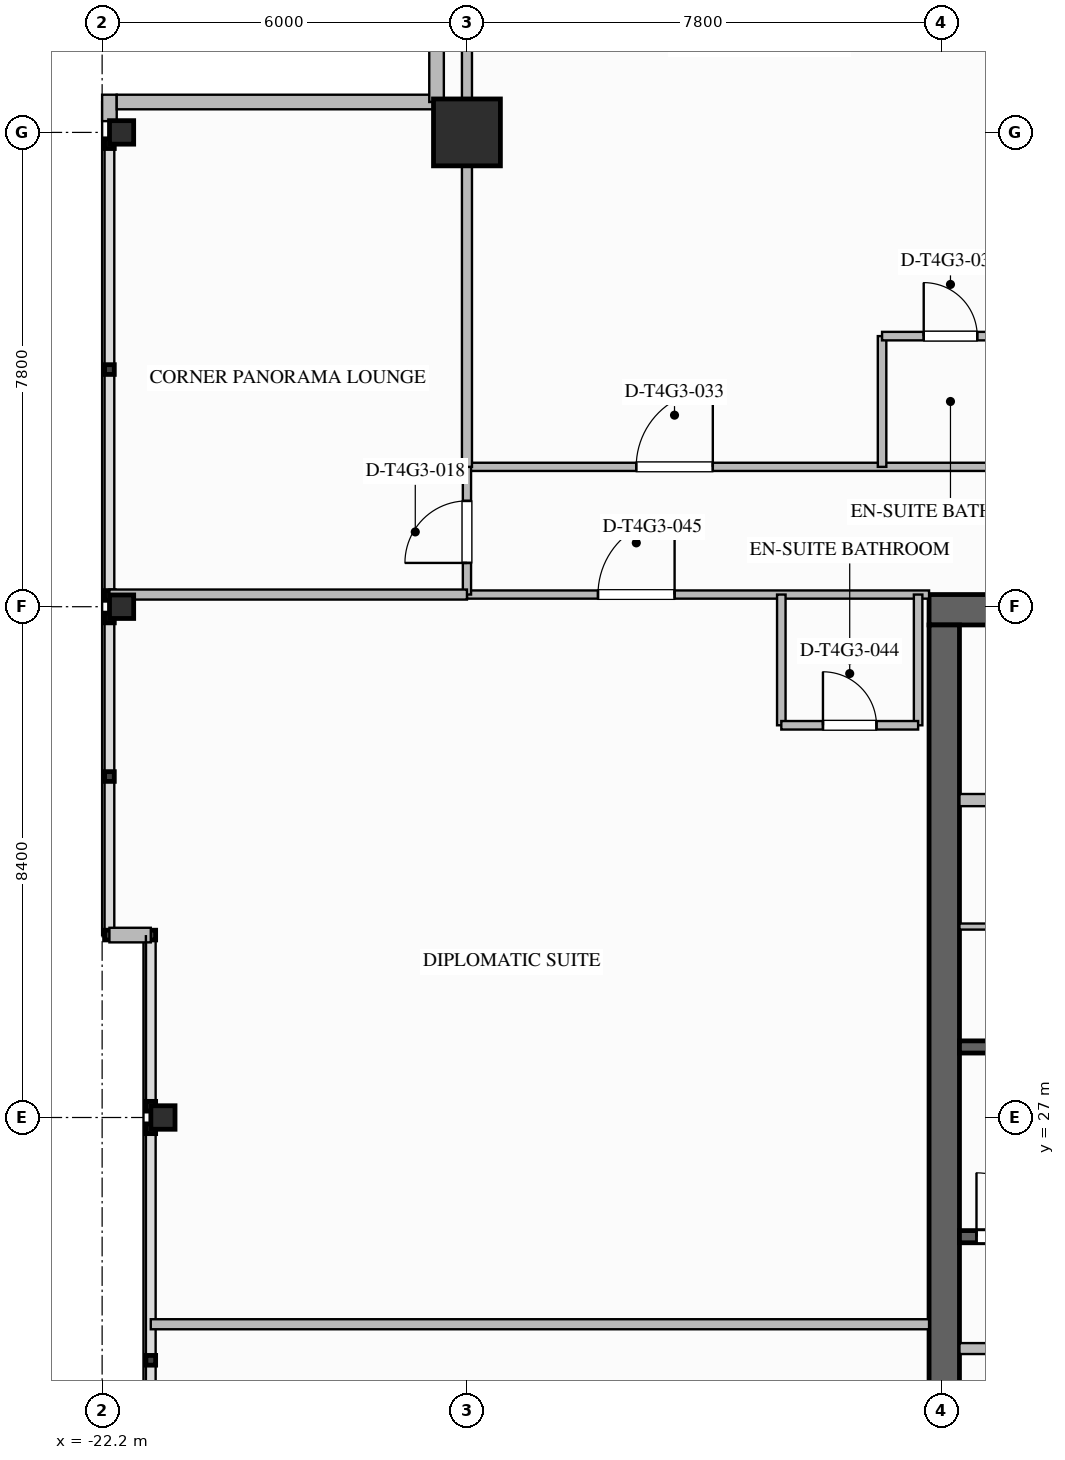
"""IFC4 building model, lengths in metres.
Left out: names, types, materials, properties, quantities, classifications, styles, units other than length and angle.
Written with IfcOpenShell. Run it as: python <this file> out.ifc"""

import sys

from ifc_helpers import new_model, si_unit, direction, frame, frame_2d, origin, origin_2d, place, context, subcontext, project, spatial, rectangle, i_section, extrude, element, fill, save


model = new_model("IFC4")
c1 = context("Model", 3, precision=1e-05, world=origin(), true_north=direction((0.0, 1.0)))
c2 = subcontext(c1, "Body", "Model", "MODEL_VIEW")
j1 = project(units=[si_unit("LENGTHUNIT", "METRE"), si_unit("PLANEANGLEUNIT", "RADIAN")], contexts=[c1])
p1 = place(None, origin())
s1 = spatial("IfcSite", under=j1, at=p1, CompositionType="ELEMENT")
p2 = place(p1, origin())
s2 = spatial("IfcBuilding", under=s1, at=p2, CompositionType="ELEMENT")
p3 = place(p2, frame((0.0, 0.0, 226.7)))
s3 = spatial("IfcBuildingStorey", under=s2, at=p3, CompositionType="ELEMENT", Elevation=226.7)
p4 = place(p3, frame((-8.6, 35.35, 0.0), z_axis=(0.0, 0.0, 1.0), x_axis=(1.0, 0.0, 0.0)))
e1 = element("IfcWall", 1, at=p4, inside=s3, PredefinedType="SHEAR", context=c2, shape_type="SweptSolid", body=[
    extrude(rectangle(XDim=17.2, YDim=0.5, at=frame_2d((8.6, 0.0))), origin(), (0.0, 0.0, 1.0), 3.6),
])
p5 = place(p3, frame((-8.35, 18.9, 0.0), z_axis=(0.0, 0.0, 1.0), x_axis=(0.0, 1.0, 0.0)))
e2 = element("IfcWall", 2, at=p5, inside=s3, PredefinedType="SHEAR", context=c2, shape_type="SweptSolid", body=[
    extrude(rectangle(XDim=16.2, YDim=0.5, at=frame_2d((8.1, 0.0))), origin(), (0.0, 0.0, 1.0), 3.6),
])
p6 = place(p3, frame((-16.2, 43.2, 0.0), z_axis=(0.0, 0.0, 1.0), x_axis=(1.0, 0.0, 0.0)))
e3 = element("IfcColumn", 3, at=p6, inside=s3, PredefinedType="COLUMN", context=c2, shape_type="SweptSolid", body=[
    extrude(rectangle(XDim=1.1, YDim=1.1, at=origin_2d()), origin(), (0.0, 0.0, 1.0), 3.6),
])
for number, where, z_axis, x_axis in (
    (4, (-21.2, 27.0, 0.0), (0.0, 0.0, 1.0), (1.0, 0.0, 0.0)),
    (5, (-21.88, 35.4, 0.0), (0.0, 0.0, 1.0), (1.0, 0.0, 0.0)),
    (6, (-21.88, 43.2, 0.0), (0.0, 0.0, 1.0), (1.0, 0.0, 0.0)),
):
    element("IfcColumn", number, at=place(p3, frame(where, z_axis=z_axis, x_axis=x_axis)), inside=s3, PredefinedType="COLUMN", context=c2, shape_type="SweptSolid", body=[
        extrude(i_section(OverallWidth=0.397, OverallDepth=0.387, WebThickness=0.021, FlangeThickness=0.033, FilletRadius=0.025, at=origin_2d()), origin(), (0.0, 0.0, 1.0), 3.597),
    ])
p7 = place(p3, frame((-22.08, 43.385, 0.0), z_axis=(0.0, 0.0, 1.0), x_axis=(0.0, 1.0, 0.0)))
e7 = element("IfcWall", 7, at=p7, inside=s3, PredefinedType="STANDARD", context=c2, shape_type="SweptSolid", body=[
    extrude(rectangle(XDim=0.435, YDim=0.24, at=frame_2d((0.217, 0.0))), origin(), (0.0, 0.0, 1.0), 3.34),
])
for number, where, z_axis, x_axis in (
    (8, (-21.96, 43.7, 0.0), (0.0, 0.0, 1.0), (1.0, 0.0, 0.0)),
    (9, (-16.7, 43.7, 0.0), (0.0, 0.0, 1.0), (0.0, 1.0, 0.0)),
):
    element("IfcWall", number, at=place(p3, frame(where, z_axis=z_axis, x_axis=x_axis)), inside=s3, PredefinedType="STANDARD", context=c2, shape_type="SweptSolid", body=[
        extrude(rectangle(XDim=5.26, YDim=0.24, at=frame_2d((2.63, 0.0))), origin(), (0.0, 0.0, 1.0), 3.34),
    ])
p8 = place(p3, frame((-21.4, 30.0, 0.0), z_axis=(0.0, 0.0, 1.0), x_axis=(-1.0, 0.0, 0.0)))
e10 = element("IfcWall", 10, at=p8, inside=s3, PredefinedType="STANDARD", context=c2, shape_type="SweptSolid", body=[
    extrude(rectangle(XDim=0.68, YDim=0.24, at=frame_2d((0.34, 0.0))), origin(), (0.0, 0.0, 1.0), 3.34),
])
p9 = place(p3, frame((-8.1, 25.04, 0.0), z_axis=(0.0, 0.0, 1.0), x_axis=(1.0, 0.0, 0.0)))
e11 = element("IfcWall", 11, at=p9, inside=s3, PredefinedType="SOLIDWALL", context=c2, shape_type="SweptSolid", body=[
    extrude(rectangle(XDim=8.1, YDim=0.2, at=frame_2d((4.05, 0.0))), origin(), (0.0, 0.0, 1.0), 3.34),
])
p10 = place(p9, frame((0.28, 0.0, 0.0)))
e12 = element("IfcOpeningElement", 12, at=p10, cuts=e11, PredefinedType="OPENING", context=c2, shape_type="SweptSolid", body=[
    extrude(rectangle(XDim=1.05, YDim=2.1, at=frame_2d((0.525, 1.05))), frame((0.0, 0.11, 0.0), z_axis=(0.0, -1.0, 0.0), x_axis=(1.0, 0.0, 0.0)), (0.0, 0.0, 1.0), 0.22),
])
p11 = place(p3, frame((-8.1, 28.16, 0.0), z_axis=(0.0, 0.0, 1.0), x_axis=(1.0, 0.0, 0.0)))
e13 = element("IfcWall", 13, at=p11, inside=s3, PredefinedType="SOLIDWALL", context=c2, shape_type="SweptSolid", body=[
    extrude(rectangle(XDim=8.1, YDim=0.2, at=frame_2d((4.05, 0.0))), origin(), (0.0, 0.0, 1.0), 3.34),
])
p12 = place(p3, frame((-8.1, 32.22, 0.0), z_axis=(0.0, 0.0, 1.0), x_axis=(1.0, 0.0, 0.0)))
e14 = element("IfcWall", 14, at=p12, inside=s3, PredefinedType="SOLIDWALL", context=c2, shape_type="SweptSolid", body=[
    extrude(rectangle(XDim=7.1, YDim=0.2, at=frame_2d((3.55, 0.0))), origin(), (0.0, 0.0, 1.0), 3.34),
])
p13 = place(p12, frame((0.95, 0.0, 0.0)))
e15 = element("IfcOpeningElement", 15, at=p13, cuts=e14, PredefinedType="OPENING", context=c2, shape_type="SweptSolid", body=[
    extrude(rectangle(XDim=1.1, YDim=2.2, at=frame_2d((0.55, 1.1))), frame((0.0, 0.11, 0.0), z_axis=(0.0, -1.0, 0.0), x_axis=(1.0, 0.0, 0.0)), (0.0, 0.0, 1.0), 0.22),
])
p14 = place(p12, frame((3.27, 0.0, 0.0)))
e16 = element("IfcOpeningElement", 16, at=p14, cuts=e14, PredefinedType="OPENING", context=c2, shape_type="SweptSolid", body=[
    extrude(rectangle(XDim=1.1, YDim=2.2, at=frame_2d((0.55, 1.1))), frame((0.0, 0.11, 0.0), z_axis=(0.0, -1.0, 0.0), x_axis=(1.0, 0.0, 0.0)), (0.0, 0.0, 1.0), 0.22),
])
p15 = place(p12, frame((5.59, 0.0, 0.0)))
e17 = element("IfcOpeningElement", 17, at=p15, cuts=e14, PredefinedType="OPENING", context=c2, shape_type="SweptSolid", body=[
    extrude(rectangle(XDim=1.1, YDim=2.2, at=frame_2d((0.55, 1.1))), frame((0.0, 0.11, 0.0), z_axis=(0.0, -1.0, 0.0), x_axis=(1.0, 0.0, 0.0)), (0.0, 0.0, 1.0), 0.22),
])
p16 = place(p3, frame((-8.1, 30.14, 0.0), z_axis=(0.0, 0.0, 1.0), x_axis=(1.0, 0.0, 0.0)))
e18 = element("IfcWall", 18, at=p16, inside=s3, PredefinedType="PARTITIONING", context=c2, shape_type="SweptSolid", body=[
    extrude(rectangle(XDim=7.1, YDim=0.1, at=frame_2d((3.55, 0.0))), origin(), (0.0, 0.0, 1.0), 3.34),
])
p17 = place(p16, frame((2.8, 0.0, 0.0)))
e19 = element("IfcOpeningElement", 19, at=p17, cuts=e18, PredefinedType="OPENING", context=c2, shape_type="SweptSolid", body=[
    extrude(rectangle(XDim=0.92, YDim=2.1, at=frame_2d((0.46, 1.05))), frame((0.0, 0.06, 0.0), z_axis=(0.0, -1.0, 0.0), x_axis=(1.0, 0.0, 0.0)), (0.0, 0.0, 1.0), 0.12),
])
p18 = place(p3, frame((-8.1, 23.2, 0.0), z_axis=(0.0, 0.0, 1.0), x_axis=(1.0, 0.0, 0.0)))
e20 = element("IfcWall", 20, at=p18, inside=s3, PredefinedType="SOLIDWALL", context=c2, shape_type="SweptSolid", body=[
    extrude(rectangle(XDim=16.2, YDim=0.18, at=frame_2d((8.1, 0.0))), origin(), (0.0, 0.0, 1.0), 3.34),
])
p19 = place(p18, frame((2.8, 0.0, 0.0)))
e21 = element("IfcOpeningElement", 21, at=p19, cuts=e20, PredefinedType="OPENING", context=c2, shape_type="SweptSolid", body=[
    extrude(rectangle(XDim=1.0, YDim=2.1, at=frame_2d((0.5, 1.05))), frame((0.0, 0.1, 0.0), z_axis=(0.0, -1.0, 0.0), x_axis=(1.0, 0.0, 0.0)), (0.0, 0.0, 1.0), 0.2),
])
p20 = place(p18, frame((11.5, 0.0, 0.0)))
e22 = element("IfcOpeningElement", 22, at=p20, cuts=e20, PredefinedType="OPENING", context=c2, shape_type="SweptSolid", body=[
    extrude(rectangle(XDim=1.0, YDim=2.1, at=frame_2d((0.5, 1.05))), frame((0.0, 0.1, 0.0), z_axis=(0.0, -1.0, 0.0), x_axis=(1.0, 0.0, 0.0)), (0.0, 0.0, 1.0), 0.2),
])
p21 = place(p3, frame((-16.2, 37.7, 0.0), z_axis=(0.0, 0.0, 1.0), x_axis=(1.0, 0.0, 0.0)))
e23 = element("IfcWall", 23, at=p21, inside=s3, PredefinedType="PARTITIONING", context=c2, shape_type="SweptSolid", body=[
    extrude(rectangle(XDim=38.28, YDim=0.135, at=frame_2d((19.14, 0.0))), origin(), (0.0, 0.0, 1.0), 3.34),
])
p22 = place(p21, frame((33.355, 0.0, 0.0)))
e24 = element("IfcOpeningElement", 24, at=p22, cuts=e23, PredefinedType="OPENING", context=c2, shape_type="SweptSolid", body=[
    extrude(rectangle(XDim=1.26, YDim=2.2, at=frame_2d((0.63, 1.1))), frame((0.0, 0.077, 0.0), z_axis=(0.0, -1.0, 0.0), x_axis=(1.0, 0.0, 0.0)), (0.0, 0.0, 1.0), 0.155),
])
p23 = place(p21, frame((2.784, 0.0, 0.0)))
e25 = element("IfcOpeningElement", 25, at=p23, cuts=e23, PredefinedType="OPENING", context=c2, shape_type="SweptSolid", body=[
    extrude(rectangle(XDim=1.26, YDim=2.2, at=frame_2d((0.63, 1.1))), frame((0.0, 0.077, 0.0), z_axis=(0.0, -1.0, 0.0), x_axis=(1.0, 0.0, 0.0)), (0.0, 0.0, 1.0), 0.155),
])
p24 = place(p21, frame((13.969, 0.0, 0.0)))
e26 = element("IfcOpeningElement", 26, at=p24, cuts=e23, PredefinedType="OPENING", context=c2, shape_type="SweptSolid", body=[
    extrude(rectangle(XDim=1.26, YDim=2.2, at=frame_2d((0.63, 1.1))), frame((0.0, 0.077, 0.0), z_axis=(0.0, -1.0, 0.0), x_axis=(1.0, 0.0, 0.0)), (0.0, 0.0, 1.0), 0.155),
])
p25 = place(p21, frame((25.541, 0.0, 0.0)))
e27 = element("IfcOpeningElement", 27, at=p25, cuts=e23, PredefinedType="OPENING", context=c2, shape_type="SweptSolid", body=[
    extrude(rectangle(XDim=1.26, YDim=2.2, at=frame_2d((0.63, 1.1))), frame((0.0, 0.077, 0.0), z_axis=(0.0, -1.0, 0.0), x_axis=(1.0, 0.0, 0.0)), (0.0, 0.0, 1.0), 0.155),
])
p26 = place(p3, frame((-16.2, 35.6, 0.0), z_axis=(0.0, 0.0, 1.0), x_axis=(1.0, 0.0, 0.0)))
e28 = element("IfcWall", 28, at=p26, inside=s3, PredefinedType="PARTITIONING", context=c2, shape_type="SweptSolid", body=[
    extrude(rectangle(XDim=7.6, YDim=0.135, at=frame_2d((3.8, 0.0))), origin(), (0.0, 0.0, 1.0), 2.718),
])
p27 = place(p26, frame((2.155, 0.0, 0.0)))
e29 = element("IfcOpeningElement", 29, at=p27, cuts=e28, PredefinedType="OPENING", context=c2, shape_type="SweptSolid", body=[
    extrude(rectangle(XDim=1.26, YDim=2.2, at=frame_2d((0.63, 1.1))), frame((0.0, 0.077, 0.0), z_axis=(0.0, -1.0, 0.0), x_axis=(1.0, 0.0, 0.0)), (0.0, 0.0, 1.0), 0.155),
])
p28 = place(p3, frame((-16.2, 35.6, 0.0), z_axis=(0.0, 0.0, 1.0), x_axis=(0.0, 1.0, 0.0)))
e30 = element("IfcWall", 30, at=p28, inside=s3, PredefinedType="PARTITIONING", context=c2, shape_type="SweptSolid", body=[
    extrude(rectangle(XDim=2.1, YDim=0.135, at=frame_2d((1.05, 0.0))), origin(), (0.0, 0.0, 1.0), 2.714),
])
p29 = place(p28, frame((0.52, 0.0, 0.0)))
e31 = element("IfcOpeningElement", 31, at=p29, cuts=e30, PredefinedType="OPENING", context=c2, shape_type="SweptSolid", body=[
    extrude(rectangle(XDim=1.02, YDim=2.15, at=frame_2d((0.51, 1.075))), frame((0.0, 0.077, 0.0), z_axis=(0.0, -1.0, 0.0), x_axis=(1.0, 0.0, 0.0)), (0.0, 0.0, 1.0), 0.155),
])
p30 = place(p3, frame((-16.2, 37.7, 0.0), z_axis=(0.0, 0.0, 1.0), x_axis=(0.0, 1.0, 0.0)))
e32 = element("IfcWall", 32, at=p30, inside=s3, PredefinedType="PARTITIONING", context=c2, shape_type="SweptSolid", body=[
    extrude(rectangle(XDim=11.38, YDim=0.165, at=frame_2d((5.69, 0.0))), origin(), (0.0, 0.0, 1.0), 2.714),
])
p31 = place(p3, frame((-22.08, 35.6, 0.0), z_axis=(0.0, 0.0, 1.0), x_axis=(1.0, 0.0, 0.0)))
e33 = element("IfcWall", 33, at=p31, inside=s3, PredefinedType="PARTITIONING", context=c2, shape_type="SweptSolid", body=[
    extrude(rectangle(XDim=5.88, YDim=0.165, at=frame_2d((2.94, 0.0))), origin(), (0.0, 0.0, 1.0), 2.714),
])
p32 = place(p3, frame((-9.373, 37.7, 0.0), z_axis=(0.0, 0.0, 1.0), x_axis=(0.0, 1.0, 0.0)))
e34 = element("IfcWall", 34, at=p32, inside=s3, PredefinedType="PLUMBINGWALL", context=c2, shape_type="SweptSolid", body=[
    extrude(rectangle(XDim=2.15, YDim=0.14, at=frame_2d((1.075, 0.0))), origin(), (0.0, 0.0, 1.0), 3.34),
])
p33 = place(p3, frame((-9.373, 39.85, 0.0), z_axis=(0.0, 0.0, 1.0), x_axis=(1.0, 0.0, 0.0)))
e35 = element("IfcWall", 35, at=p33, inside=s3, PredefinedType="PLUMBINGWALL", context=c2, shape_type="SweptSolid", body=[
    extrude(rectangle(XDim=2.25, YDim=0.14, at=frame_2d((1.125, 0.0))), origin(), (0.0, 0.0, 1.0), 3.34),
])
p34 = place(p33, frame((0.685, 0.0, 0.0)))
e36 = element("IfcOpeningElement", 36, at=p34, cuts=e35, PredefinedType="OPENING", context=c2, shape_type="SweptSolid", body=[
    extrude(rectangle(XDim=0.88, YDim=2.1, at=frame_2d((0.44, 1.05))), frame((0.0, 0.08, 0.0), z_axis=(0.0, -1.0, 0.0), x_axis=(1.0, 0.0, 0.0)), (0.0, 0.0, 1.0), 0.16),
])
p35 = place(p3, frame((-21.4, 23.6, 0.0), z_axis=(0.0, 0.0, 1.0), x_axis=(1.0, 0.0, 0.0)))
e37 = element("IfcWall", 37, at=p35, inside=s3, PredefinedType="PARTITIONING", context=c2, shape_type="SweptSolid", body=[
    extrude(rectangle(XDim=12.8, YDim=0.165, at=frame_2d((6.4, 0.0))), origin(), (0.0, 0.0, 1.0), 3.34),
])
for number, where, z_axis, x_axis in (
    (38, (-11.03, 35.6, 0.0), (0.0, 0.0, 1.0), (0.0, -1.0, 0.0)),
    (39, (-8.78, 35.6, 0.0), (0.0, 0.0, 1.0), (0.0, -1.0, 0.0)),
):
    element("IfcWall", number, at=place(p3, frame(where, z_axis=z_axis, x_axis=x_axis)), inside=s3, PredefinedType="PLUMBINGWALL", context=c2, shape_type="SweptSolid", body=[
        extrude(rectangle(XDim=2.15, YDim=0.14, at=frame_2d((1.075, 0.0))), origin(), (0.0, 0.0, 1.0), 3.34),
    ])
p36 = place(p3, frame((-11.03, 33.45, 0.0), z_axis=(0.0, 0.0, 1.0), x_axis=(1.0, 0.0, 0.0)))
e40 = element("IfcWall", 40, at=p36, inside=s3, PredefinedType="PLUMBINGWALL", context=c2, shape_type="SweptSolid", body=[
    extrude(rectangle(XDim=2.25, YDim=0.14, at=frame_2d((1.125, 0.0))), origin(), (0.0, 0.0, 1.0), 3.34),
])
p37 = place(p36, frame((0.685, 0.0, 0.0)))
e41 = element("IfcOpeningElement", 41, at=p37, cuts=e40, PredefinedType="OPENING", context=c2, shape_type="SweptSolid", body=[
    extrude(rectangle(XDim=0.88, YDim=2.1, at=frame_2d((0.44, 1.05))), frame((0.0, 0.08, 0.0), z_axis=(0.0, -1.0, 0.0), x_axis=(1.0, 0.0, 0.0)), (0.0, 0.0, 1.0), 0.16),
])
p38 = place(p10, origin())
e42 = element("IfcDoor", 42, at=p38, inside=s3, OperationType="SINGLE_SWING_LEFT", PredefinedType="DOOR", context=c2, shape_type="SweptSolid", body=[
    extrude(rectangle(XDim=1.05, YDim=2.1, at=frame_2d((0.525, 1.05))), frame((0.0, 0.025, 0.0), z_axis=(0.0, -1.0, 0.0), x_axis=(1.0, 0.0, 0.0)), (0.0, 0.0, 1.0), 0.05),
])
fill(e12, e42)
p39 = place(p29, origin())
e43 = element("IfcDoor", 43, at=p39, inside=s3, OperationType="SINGLE_SWING_LEFT", PredefinedType="DOOR", context=c2, shape_type="SweptSolid", body=[
    extrude(rectangle(XDim=1.02, YDim=2.15, at=frame_2d((0.51, 1.075))), frame((0.0, 0.025, 0.0), z_axis=(0.0, -1.0, 0.0), x_axis=(1.0, 0.0, 0.0)), (0.0, 0.0, 1.0), 0.05),
])
fill(e31, e43)
p40 = place(p34, origin())
e44 = element("IfcDoor", 44, at=p40, inside=s3, OperationType="SINGLE_SWING_LEFT", PredefinedType="DOOR", context=c2, shape_type="SweptSolid", body=[
    extrude(rectangle(XDim=0.88, YDim=2.1, at=frame_2d((0.44, 1.05))), frame((0.0, 0.025, 0.0), z_axis=(0.0, -1.0, 0.0), x_axis=(1.0, 0.0, 0.0)), (0.0, 0.0, 1.0), 0.05),
])
fill(e36, e44)
p41 = place(p23, origin())
e45 = element("IfcDoor", 45, at=p41, inside=s3, OperationType="SINGLE_SWING_RIGHT", PredefinedType="DOOR", context=c2, shape_type="SweptSolid", body=[
    extrude(rectangle(XDim=1.26, YDim=2.2, at=frame_2d((0.63, 1.1))), frame((0.0, 0.025, 0.0), z_axis=(0.0, -1.0, 0.0), x_axis=(1.0, 0.0, 0.0)), (0.0, 0.0, 1.0), 0.05),
])
fill(e25, e45)
p42 = place(p37, origin())
e46 = element("IfcDoor", 46, at=p42, inside=s3, OperationType="SINGLE_SWING_LEFT", PredefinedType="DOOR", context=c2, shape_type="SweptSolid", body=[
    extrude(rectangle(XDim=0.88, YDim=2.1, at=frame_2d((0.44, 1.05))), frame((0.0, 0.025, 0.0), z_axis=(0.0, -1.0, 0.0), x_axis=(1.0, 0.0, 0.0)), (0.0, 0.0, 1.0), 0.05),
])
fill(e41, e46)
p43 = place(p27, origin())
e47 = element("IfcDoor", 47, at=p43, inside=s3, OperationType="SINGLE_SWING_RIGHT", PredefinedType="DOOR", context=c2, shape_type="SweptSolid", body=[
    extrude(rectangle(XDim=1.26, YDim=2.2, at=frame_2d((0.63, 1.1))), frame((0.0, 0.025, 0.0), z_axis=(0.0, -1.0, 0.0), x_axis=(1.0, 0.0, 0.0)), (0.0, 0.0, 1.0), 0.05),
])
fill(e29, e47)
save(model, sys.argv[1])
